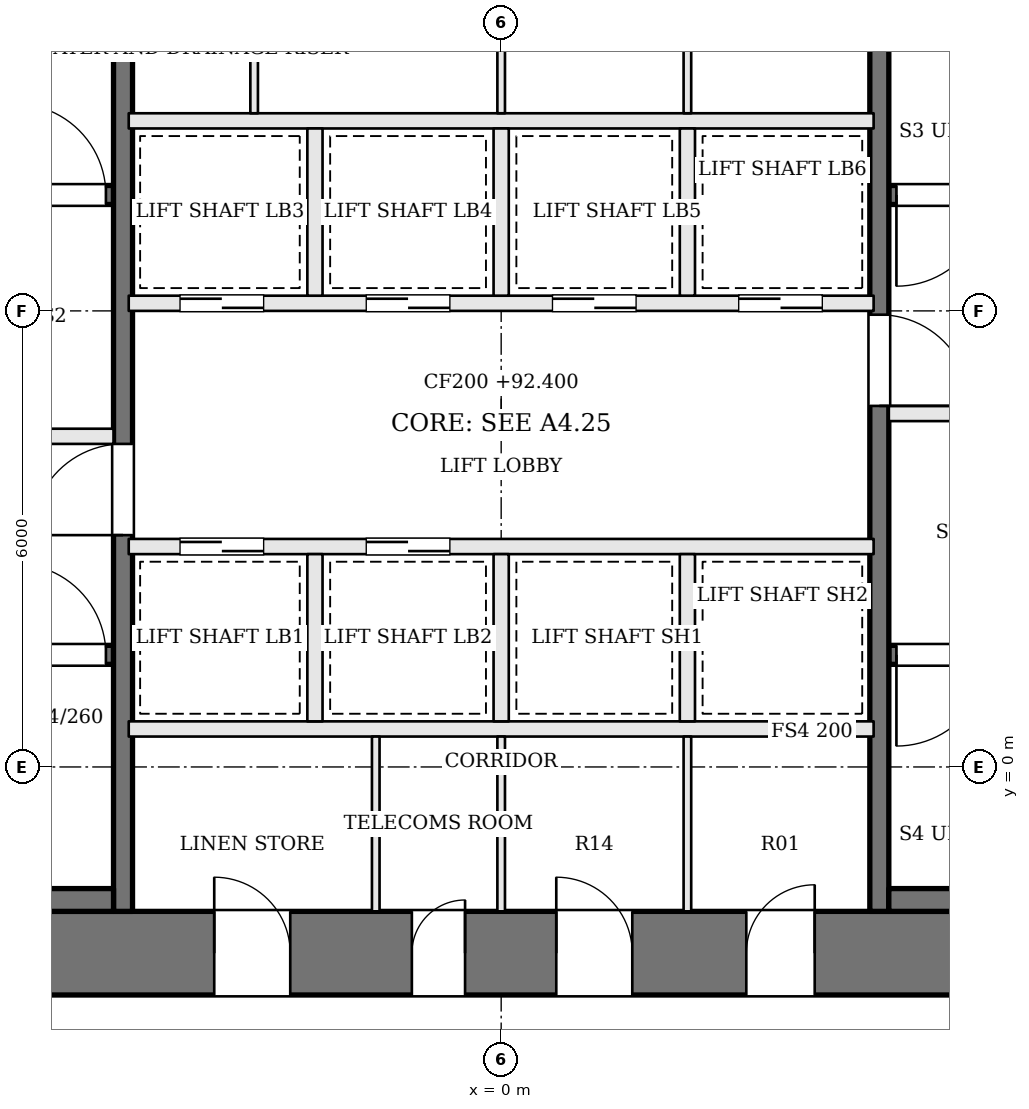
"""IFC4 building model, lengths in metres.
Left out: names, types, materials, properties, quantities, classifications, styles, units other than length and angle.
Written with IfcOpenShell. Run it as: python <this file> out.ifc"""

import sys

from ifc_helpers import new_model, si_unit, direction, frame, frame_2d, origin, place, context, subcontext, project, spatial, rectangle, extrude, element, fill, save


model = new_model("IFC4")
c1 = context("Model", 3, precision=1e-05, world=origin(), true_north=direction((0.0, 1.0)))
c2 = subcontext(c1, "Body", "Model", "MODEL_VIEW")
j1 = project(units=[si_unit("LENGTHUNIT", "METRE"), si_unit("PLANEANGLEUNIT", "RADIAN")], contexts=[c1])
p1 = place(None, origin())
s1 = spatial("IfcSite", under=j1, at=p1, CompositionType="ELEMENT")
p2 = place(p1, origin())
s2 = spatial("IfcBuilding", under=s1, at=p2, CompositionType="ELEMENT")
p3 = place(p2, frame((0.0, 0.0, 92.4)))
s3 = spatial("IfcBuildingStorey", under=s2, at=p3, CompositionType="ELEMENT", Elevation=92.4)
p4 = place(p3, frame((-13.0, -2.45, 0.0), z_axis=(0.0, 0.0, 1.0), x_axis=(1.0, 0.0, 0.0)))
e1 = element("IfcWall", 1, at=p4, inside=s3, PredefinedType="SHEAR", context=c2, shape_type="SweptSolid", body=[
    extrude(rectangle(XDim=26.0, YDim=1.1, at=frame_2d((13.0, 0.0))), origin(), (0.0, 0.0, 1.0), 3.6),
])
p5 = place(p4, frame((9.225, 0.0, 0.0)))
e2 = element("IfcOpeningElement", 2, at=p5, cuts=e1, PredefinedType="OPENING", context=c2, shape_type="SweptSolid", body=[
    extrude(rectangle(XDim=1.0, YDim=2.1, at=frame_2d((0.5, 1.05))), frame((0.0, 0.56, 0.0), z_axis=(0.0, -1.0, 0.0), x_axis=(1.0, 0.0, 0.0)), (0.0, 0.0, 1.0), 1.12),
])
p6 = place(p4, frame((11.825, 0.0, 0.0)))
e3 = element("IfcOpeningElement", 3, at=p6, cuts=e1, PredefinedType="OPENING", context=c2, shape_type="SweptSolid", body=[
    extrude(rectangle(XDim=0.7, YDim=2.1, at=frame_2d((0.35, 1.05))), frame((0.0, 0.56, 0.0), z_axis=(0.0, -1.0, 0.0), x_axis=(1.0, 0.0, 0.0)), (0.0, 0.0, 1.0), 1.12),
])
p7 = place(p4, frame((13.725, 0.0, 0.0)))
e4 = element("IfcOpeningElement", 4, at=p7, cuts=e1, PredefinedType="OPENING", context=c2, shape_type="SweptSolid", body=[
    extrude(rectangle(XDim=1.0, YDim=2.1, at=frame_2d((0.5, 1.05))), frame((0.0, 0.56, 0.0), z_axis=(0.0, -1.0, 0.0), x_axis=(1.0, 0.0, 0.0)), (0.0, 0.0, 1.0), 1.12),
])
p8 = place(p4, frame((16.225, 0.0, 0.0)))
e5 = element("IfcOpeningElement", 5, at=p8, cuts=e1, PredefinedType="OPENING", context=c2, shape_type="SweptSolid", body=[
    extrude(rectangle(XDim=0.9, YDim=2.1, at=frame_2d((0.45, 1.05))), frame((0.0, 0.56, 0.0), z_axis=(0.0, -1.0, 0.0), x_axis=(1.0, 0.0, 0.0)), (0.0, 0.0, 1.0), 1.12),
])
p9 = place(p3, frame((-11.9, 1.475, 0.0), z_axis=(0.0, 0.0, 1.0), x_axis=(1.0, 0.0, 0.0)))
e6 = element("IfcWall", 6, at=p9, inside=s3, PredefinedType="SOLIDWALL", context=c2, shape_type="SweptSolid", body=[
    extrude(rectangle(XDim=6.8, YDim=0.25, at=frame_2d((3.4, 0.0))), origin(), (0.0, 0.0, 1.0), 3.4),
])
p10 = place(p9, frame((5.5, 0.0, 0.0)))
e7 = element("IfcOpeningElement", 7, at=p10, cuts=e6, PredefinedType="OPENING", context=c2, shape_type="SweptSolid", body=[
    extrude(rectangle(XDim=1.2, YDim=2.1, at=frame_2d((0.6, 1.05))), frame((0.0, 0.135, 0.0), z_axis=(0.0, -1.0, 0.0), x_axis=(1.0, 0.0, 0.0)), (0.0, 0.0, 1.0), 0.27),
])
p11 = place(p3, frame((11.9, 7.525, 0.0), z_axis=(0.0, 0.0, 1.0), x_axis=(-1.0, 0.0, 0.0)))
e8 = element("IfcWall", 8, at=p11, inside=s3, PredefinedType="SOLIDWALL", context=c2, shape_type="SweptSolid", body=[
    extrude(rectangle(XDim=6.8, YDim=0.25, at=frame_2d((3.4, 0.0))), origin(), (0.0, 0.0, 1.0), 3.4),
])
p12 = place(p11, frame((5.5, 0.0, 0.0)))
e9 = element("IfcOpeningElement", 9, at=p12, cuts=e8, PredefinedType="OPENING", context=c2, shape_type="SweptSolid", body=[
    extrude(rectangle(XDim=1.2, YDim=2.1, at=frame_2d((0.6, 1.05))), frame((0.0, 0.135, 0.0), z_axis=(0.0, -1.0, 0.0), x_axis=(1.0, 0.0, 0.0)), (0.0, 0.0, 1.0), 0.27),
])
p13 = place(p3, frame((-11.9, 4.35, 0.0), z_axis=(0.0, 0.0, 1.0), x_axis=(1.0, 0.0, 0.0)))
e10 = element("IfcWall", 10, at=p13, inside=s3, PredefinedType="SOLIDWALL", context=c2, shape_type="SweptSolid", body=[
    extrude(rectangle(XDim=6.8, YDim=0.2, at=frame_2d((3.4, 0.0))), origin(), (0.0, 0.0, 1.0), 3.4),
])
p14 = place(p13, frame((4.1, 0.0, 0.0)))
e11 = element("IfcOpeningElement", 11, at=p14, cuts=e10, PredefinedType="OPENING", context=c2, shape_type="SweptSolid", body=[
    extrude(rectangle(XDim=1.2, YDim=2.1, at=frame_2d((0.6, 1.05))), frame((0.0, 0.11, 0.0), z_axis=(0.0, -1.0, 0.0), x_axis=(1.0, 0.0, 0.0)), (0.0, 0.0, 1.0), 0.22),
])
p15 = place(p13, frame((0.8, 0.0, 0.0)))
e12 = element("IfcOpeningElement", 12, at=p15, cuts=e10, PredefinedType="OPENING", context=c2, shape_type="SweptSolid", body=[
    extrude(rectangle(XDim=1.2, YDim=2.1, at=frame_2d((0.6, 1.05))), frame((0.0, 0.11, 0.0), z_axis=(0.0, -1.0, 0.0), x_axis=(1.0, 0.0, 0.0)), (0.0, 0.0, 1.0), 0.22),
])
p16 = place(p3, frame((11.9, 4.65, 0.0), z_axis=(0.0, 0.0, 1.0), x_axis=(-1.0, 0.0, 0.0)))
e13 = element("IfcWall", 13, at=p16, inside=s3, PredefinedType="SOLIDWALL", context=c2, shape_type="SweptSolid", body=[
    extrude(rectangle(XDim=6.8, YDim=0.2, at=frame_2d((3.4, 0.0))), origin(), (0.0, 0.0, 1.0), 3.4),
])
p17 = place(p16, frame((4.1, 0.0, 0.0)))
e14 = element("IfcOpeningElement", 14, at=p17, cuts=e13, PredefinedType="OPENING", context=c2, shape_type="SweptSolid", body=[
    extrude(rectangle(XDim=1.2, YDim=2.1, at=frame_2d((0.6, 1.05))), frame((0.0, 0.11, 0.0), z_axis=(0.0, -1.0, 0.0), x_axis=(1.0, 0.0, 0.0)), (0.0, 0.0, 1.0), 0.22),
])
p18 = place(p16, frame((0.8, 0.0, 0.0)))
e15 = element("IfcOpeningElement", 15, at=p18, cuts=e13, PredefinedType="OPENING", context=c2, shape_type="SweptSolid", body=[
    extrude(rectangle(XDim=1.2, YDim=2.1, at=frame_2d((0.6, 1.05))), frame((0.0, 0.11, 0.0), z_axis=(0.0, -1.0, 0.0), x_axis=(1.0, 0.0, 0.0)), (0.0, 0.0, 1.0), 0.22),
])
p19 = place(p3, frame((-11.9, 7.525, 0.0), z_axis=(0.0, 0.0, 1.0), x_axis=(1.0, 0.0, 0.0)))
e16 = element("IfcWall", 16, at=p19, inside=s3, PredefinedType="SOLIDWALL", context=c2, shape_type="SweptSolid", body=[
    extrude(rectangle(XDim=6.8, YDim=0.25, at=frame_2d((3.4, 0.0))), origin(), (0.0, 0.0, 1.0), 3.4),
])
p20 = place(p19, frame((5.5, 0.0, 0.0)))
e17 = element("IfcOpeningElement", 17, at=p20, cuts=e16, PredefinedType="OPENING", context=c2, shape_type="SweptSolid", body=[
    extrude(rectangle(XDim=1.2, YDim=2.1, at=frame_2d((0.6, 1.05))), frame((0.0, 0.135, 0.0), z_axis=(0.0, -1.0, 0.0), x_axis=(1.0, 0.0, 0.0)), (0.0, 0.0, 1.0), 0.27),
])
p21 = place(p3, frame((11.9, 1.475, 0.0), z_axis=(0.0, 0.0, 1.0), x_axis=(-1.0, 0.0, 0.0)))
e18 = element("IfcWall", 18, at=p21, inside=s3, PredefinedType="SOLIDWALL", context=c2, shape_type="SweptSolid", body=[
    extrude(rectangle(XDim=6.8, YDim=0.25, at=frame_2d((3.4, 0.0))), origin(), (0.0, 0.0, 1.0), 3.4),
])
p22 = place(p21, frame((5.5, 0.0, 0.0)))
e19 = element("IfcOpeningElement", 19, at=p22, cuts=e18, PredefinedType="OPENING", context=c2, shape_type="SweptSolid", body=[
    extrude(rectangle(XDim=1.2, YDim=2.1, at=frame_2d((0.6, 1.05))), frame((0.0, 0.135, 0.0), z_axis=(0.0, -1.0, 0.0), x_axis=(1.0, 0.0, 0.0)), (0.0, 0.0, 1.0), 0.27),
])
p23 = place(p3, frame((-4.975, -1.9, 0.0), z_axis=(0.0, 0.0, 1.0), x_axis=(0.0, 1.0, 0.0)))
e20 = element("IfcWall", 20, at=p23, inside=s3, PredefinedType="SOLIDWALL", context=c2, shape_type="SweptSolid", body=[
    extrude(rectangle(XDim=12.8, YDim=0.25, at=frame_2d((6.4, 0.0))), origin(), (0.0, 0.0, 1.0), 3.4),
])
p24 = place(p23, frame((4.95, 0.0, 0.0)))
e21 = element("IfcOpeningElement", 21, at=p24, cuts=e20, PredefinedType="OPENING", context=c2, shape_type="SweptSolid", body=[
    extrude(rectangle(XDim=1.2, YDim=2.1, at=frame_2d((0.6, 1.05))), frame((0.0, 0.135, 0.0), z_axis=(0.0, -1.0, 0.0), x_axis=(1.0, 0.0, 0.0)), (0.0, 0.0, 1.0), 0.27),
])
p25 = place(p3, frame((4.975, 10.9, 0.0), z_axis=(0.0, 0.0, 1.0), x_axis=(0.0, -1.0, 0.0)))
e22 = element("IfcWall", 22, at=p25, inside=s3, PredefinedType="SOLIDWALL", context=c2, shape_type="SweptSolid", body=[
    extrude(rectangle(XDim=12.8, YDim=0.25, at=frame_2d((6.4, 0.0))), origin(), (0.0, 0.0, 1.0), 3.4),
])
p26 = place(p25, frame((4.95, 0.0, 0.0)))
e23 = element("IfcOpeningElement", 23, at=p26, cuts=e22, PredefinedType="OPENING", context=c2, shape_type="SweptSolid", body=[
    extrude(rectangle(XDim=1.2, YDim=2.1, at=frame_2d((0.6, 1.05))), frame((0.0, 0.135, 0.0), z_axis=(0.0, -1.0, 0.0), x_axis=(1.0, 0.0, 0.0)), (0.0, 0.0, 1.0), 0.27),
])
for number, where, z_axis, x_axis in (
    (24, (-11.9, -1.75, 0.0), (0.0, 0.0, 1.0), (1.0, 0.0, 0.0)),
    (25, (11.9, -1.75, 0.0), (0.0, 0.0, 1.0), (-1.0, 0.0, 0.0)),
):
    element("IfcWall", number, at=place(p3, frame(where, z_axis=z_axis, x_axis=x_axis)), inside=s3, PredefinedType="SOLIDWALL", context=c2, shape_type="SweptSolid", body=[
        extrude(rectangle(XDim=6.8, YDim=0.3, at=frame_2d((3.4, 0.0))), origin(), (0.0, 0.0, 1.0), 3.4),
    ])
p27 = place(p3, frame((-4.9, 0.5, 0.0), z_axis=(0.0, 0.0, 1.0), x_axis=(1.0, 0.0, 0.0)))
e26 = element("IfcWall", 26, at=p27, inside=s3, PredefinedType="SOLIDWALL", context=c2, shape_type="SweptSolid", body=[
    extrude(rectangle(XDim=9.8, YDim=0.2, at=frame_2d((4.9, 0.0))), origin(), (0.0, 0.0, 1.0), 3.4),
])
p28 = place(p3, frame((-4.9, 2.9, 0.0), z_axis=(0.0, 0.0, 1.0), x_axis=(1.0, 0.0, 0.0)))
e27 = element("IfcWall", 27, at=p28, inside=s3, PredefinedType="SOLIDWALL", context=c2, shape_type="SweptSolid", body=[
    extrude(rectangle(XDim=9.8, YDim=0.2, at=frame_2d((4.9, 0.0))), origin(), (0.0, 0.0, 1.0), 3.4),
])
p29 = place(p28, frame((0.675, 0.0, 0.0)))
e28 = element("IfcOpeningElement", 28, at=p29, cuts=e27, PredefinedType="OPENING", context=c2, shape_type="SweptSolid", body=[
    extrude(rectangle(XDim=1.1, YDim=2.1, at=frame_2d((0.55, 1.05))), frame((0.0, 0.11, 0.0), z_axis=(0.0, -1.0, 0.0), x_axis=(1.0, 0.0, 0.0)), (0.0, 0.0, 1.0), 0.22),
])
p30 = place(p28, frame((3.125, 0.0, 0.0)))
e29 = element("IfcOpeningElement", 29, at=p30, cuts=e27, PredefinedType="OPENING", context=c2, shape_type="SweptSolid", body=[
    extrude(rectangle(XDim=1.1, YDim=2.1, at=frame_2d((0.55, 1.05))), frame((0.0, 0.11, 0.0), z_axis=(0.0, -1.0, 0.0), x_axis=(1.0, 0.0, 0.0)), (0.0, 0.0, 1.0), 0.22),
])
p31 = place(p3, frame((-4.9, 6.1, 0.0), z_axis=(0.0, 0.0, 1.0), x_axis=(1.0, 0.0, 0.0)))
e30 = element("IfcWall", 30, at=p31, inside=s3, PredefinedType="SOLIDWALL", context=c2, shape_type="SweptSolid", body=[
    extrude(rectangle(XDim=9.8, YDim=0.2, at=frame_2d((4.9, 0.0))), origin(), (0.0, 0.0, 1.0), 3.4),
])
p32 = place(p31, frame((0.675, 0.0, 0.0)))
e31 = element("IfcOpeningElement", 31, at=p32, cuts=e30, PredefinedType="OPENING", context=c2, shape_type="SweptSolid", body=[
    extrude(rectangle(XDim=1.1, YDim=2.1, at=frame_2d((0.55, 1.05))), frame((0.0, 0.11, 0.0), z_axis=(0.0, -1.0, 0.0), x_axis=(1.0, 0.0, 0.0)), (0.0, 0.0, 1.0), 0.22),
])
p33 = place(p31, frame((3.125, 0.0, 0.0)))
e32 = element("IfcOpeningElement", 32, at=p33, cuts=e30, PredefinedType="OPENING", context=c2, shape_type="SweptSolid", body=[
    extrude(rectangle(XDim=1.1, YDim=2.1, at=frame_2d((0.55, 1.05))), frame((0.0, 0.11, 0.0), z_axis=(0.0, -1.0, 0.0), x_axis=(1.0, 0.0, 0.0)), (0.0, 0.0, 1.0), 0.22),
])
p34 = place(p31, frame((5.575, 0.0, 0.0)))
e33 = element("IfcOpeningElement", 33, at=p34, cuts=e30, PredefinedType="OPENING", context=c2, shape_type="SweptSolid", body=[
    extrude(rectangle(XDim=1.1, YDim=2.1, at=frame_2d((0.55, 1.05))), frame((0.0, 0.11, 0.0), z_axis=(0.0, -1.0, 0.0), x_axis=(1.0, 0.0, 0.0)), (0.0, 0.0, 1.0), 0.22),
])
p35 = place(p31, frame((8.025, 0.0, 0.0)))
e34 = element("IfcOpeningElement", 34, at=p35, cuts=e30, PredefinedType="OPENING", context=c2, shape_type="SweptSolid", body=[
    extrude(rectangle(XDim=1.1, YDim=2.1, at=frame_2d((0.55, 1.05))), frame((0.0, 0.11, 0.0), z_axis=(0.0, -1.0, 0.0), x_axis=(1.0, 0.0, 0.0)), (0.0, 0.0, 1.0), 0.22),
])
p36 = place(p3, frame((-4.9, 8.5, 0.0), z_axis=(0.0, 0.0, 1.0), x_axis=(1.0, 0.0, 0.0)))
e35 = element("IfcWall", 35, at=p36, inside=s3, PredefinedType="SOLIDWALL", context=c2, shape_type="SweptSolid", body=[
    extrude(rectangle(XDim=9.8, YDim=0.2, at=frame_2d((4.9, 0.0))), origin(), (0.0, 0.0, 1.0), 3.4),
])
for number, where, z_axis, x_axis in (
    (36, (-2.45, 0.6, 0.0), (0.0, 0.0, 1.0), (0.0, 1.0, 0.0)),
    (37, (0.0, 0.6, 0.0), (0.0, 0.0, 1.0), (0.0, 1.0, 0.0)),
    (38, (2.45, 0.6, 0.0), (0.0, 0.0, 1.0), (0.0, 1.0, 0.0)),
    (39, (-2.45, 6.2, 0.0), (0.0, 0.0, 1.0), (0.0, 1.0, 0.0)),
    (40, (0.0, 6.2, 0.0), (0.0, 0.0, 1.0), (0.0, 1.0, 0.0)),
    (41, (2.45, 6.2, 0.0), (0.0, 0.0, 1.0), (0.0, 1.0, 0.0)),
):
    element("IfcWall", number, at=place(p3, frame(where, z_axis=z_axis, x_axis=x_axis)), inside=s3, PredefinedType="SOLIDWALL", context=c2, shape_type="SweptSolid", body=[
        extrude(rectangle(XDim=2.2, YDim=0.2, at=frame_2d((1.1, 0.0))), origin(), (0.0, 0.0, 1.0), 3.4),
    ])
for number, where, z_axis, x_axis in (
    (42, (-1.65, -1.9, 0.0), (0.0, 0.0, 1.0), (0.0, 1.0, 0.0)),
    (43, (0.0, -1.9, 0.0), (0.0, 0.0, 1.0), (0.0, 1.0, 0.0)),
    (44, (2.45, -1.9, 0.0), (0.0, 0.0, 1.0), (0.0, 1.0, 0.0)),
    (45, (-3.25, 8.6, 0.0), (0.0, 0.0, 1.0), (0.0, 1.0, 0.0)),
    (46, (0.0, 8.6, 0.0), (0.0, 0.0, 1.0), (0.0, 1.0, 0.0)),
    (47, (2.45, 8.6, 0.0), (0.0, 0.0, 1.0), (0.0, 1.0, 0.0)),
):
    element("IfcWall", number, at=place(p3, frame(where, z_axis=z_axis, x_axis=x_axis)), inside=s3, PredefinedType="PARTITIONING", context=c2, shape_type="SweptSolid", body=[
        extrude(rectangle(XDim=2.3, YDim=0.1, at=frame_2d((1.15, 0.0))), origin(), (0.0, 0.0, 1.0), 3.4),
    ])
p37 = place(p24, origin())
e48 = element("IfcDoor", 48, at=p37, inside=s3, OperationType="SINGLE_SWING_LEFT", PredefinedType="DOOR", context=c2, shape_type="SweptSolid", body=[
    extrude(rectangle(XDim=1.2, YDim=2.1, at=frame_2d((0.6, 1.05))), frame((0.0, 0.025, 0.0), z_axis=(0.0, -1.0, 0.0), x_axis=(1.0, 0.0, 0.0)), (0.0, 0.0, 1.0), 0.05),
])
fill(e21, e48)
p38 = place(p26, origin())
e49 = element("IfcDoor", 49, at=p38, inside=s3, OperationType="SINGLE_SWING_RIGHT", PredefinedType="DOOR", context=c2, shape_type="SweptSolid", body=[
    extrude(rectangle(XDim=1.2, YDim=2.1, at=frame_2d((0.6, 1.05))), frame((0.0, 0.025, 0.0), z_axis=(0.0, -1.0, 0.0), x_axis=(1.0, 0.0, 0.0)), (0.0, 0.0, 1.0), 0.05),
])
fill(e23, e49)
p39 = place(p10, origin())
e50 = element("IfcDoor", 50, at=p39, inside=s3, OperationType="SINGLE_SWING_LEFT", PredefinedType="DOOR", context=c2, shape_type="SweptSolid", body=[
    extrude(rectangle(XDim=1.2, YDim=2.1, at=frame_2d((0.6, 1.05))), frame((0.0, 0.025, 0.0), z_axis=(0.0, -1.0, 0.0), x_axis=(1.0, 0.0, 0.0)), (0.0, 0.0, 1.0), 0.05),
])
fill(e7, e50)
p40 = place(p12, origin())
e51 = element("IfcDoor", 51, at=p40, inside=s3, OperationType="SINGLE_SWING_RIGHT", PredefinedType="DOOR", context=c2, shape_type="SweptSolid", body=[
    extrude(rectangle(XDim=1.2, YDim=2.1, at=frame_2d((0.6, 1.05))), frame((0.0, 0.025, 0.0), z_axis=(0.0, -1.0, 0.0), x_axis=(1.0, 0.0, 0.0)), (0.0, 0.0, 1.0), 0.05),
])
fill(e9, e51)
p41 = place(p20, origin())
e52 = element("IfcDoor", 52, at=p41, inside=s3, OperationType="SINGLE_SWING_LEFT", PredefinedType="DOOR", context=c2, shape_type="SweptSolid", body=[
    extrude(rectangle(XDim=1.2, YDim=2.1, at=frame_2d((0.6, 1.05))), frame((0.0, 0.025, 0.0), z_axis=(0.0, -1.0, 0.0), x_axis=(1.0, 0.0, 0.0)), (0.0, 0.0, 1.0), 0.05),
])
fill(e17, e52)
p42 = place(p22, origin())
e53 = element("IfcDoor", 53, at=p42, inside=s3, OperationType="SINGLE_SWING_RIGHT", PredefinedType="DOOR", context=c2, shape_type="SweptSolid", body=[
    extrude(rectangle(XDim=1.2, YDim=2.1, at=frame_2d((0.6, 1.05))), frame((0.0, 0.025, 0.0), z_axis=(0.0, -1.0, 0.0), x_axis=(1.0, 0.0, 0.0)), (0.0, 0.0, 1.0), 0.05),
])
fill(e19, e53)
p43 = place(p29, origin())
e54 = element("IfcDoor", 54, at=p43, inside=s3, OperationType="SLIDING_TO_RIGHT", PredefinedType="DOOR", context=c2, shape_type="SweptSolid", body=[
    extrude(rectangle(XDim=1.1, YDim=2.1, at=frame_2d((0.55, 1.05))), frame((0.0, 0.025, 0.0), z_axis=(0.0, -1.0, 0.0), x_axis=(1.0, 0.0, 0.0)), (0.0, 0.0, 1.0), 0.05),
])
fill(e28, e54)
p44 = place(p30, origin())
e55 = element("IfcDoor", 55, at=p44, inside=s3, OperationType="SLIDING_TO_LEFT", PredefinedType="DOOR", context=c2, shape_type="SweptSolid", body=[
    extrude(rectangle(XDim=1.1, YDim=2.1, at=frame_2d((0.55, 1.05))), frame((0.0, 0.025, 0.0), z_axis=(0.0, -1.0, 0.0), x_axis=(1.0, 0.0, 0.0)), (0.0, 0.0, 1.0), 0.05),
])
fill(e29, e55)
p45 = place(p32, origin())
e56 = element("IfcDoor", 56, at=p45, inside=s3, OperationType="SLIDING_TO_RIGHT", PredefinedType="DOOR", context=c2, shape_type="SweptSolid", body=[
    extrude(rectangle(XDim=1.1, YDim=2.1, at=frame_2d((0.55, 1.05))), frame((0.0, 0.025, 0.0), z_axis=(0.0, -1.0, 0.0), x_axis=(1.0, 0.0, 0.0)), (0.0, 0.0, 1.0), 0.05),
])
fill(e31, e56)
p46 = place(p33, origin())
e57 = element("IfcDoor", 57, at=p46, inside=s3, OperationType="SLIDING_TO_LEFT", PredefinedType="DOOR", context=c2, shape_type="SweptSolid", body=[
    extrude(rectangle(XDim=1.1, YDim=2.1, at=frame_2d((0.55, 1.05))), frame((0.0, 0.025, 0.0), z_axis=(0.0, -1.0, 0.0), x_axis=(1.0, 0.0, 0.0)), (0.0, 0.0, 1.0), 0.05),
])
fill(e32, e57)
p47 = place(p34, origin())
e58 = element("IfcDoor", 58, at=p47, inside=s3, OperationType="SLIDING_TO_RIGHT", PredefinedType="DOOR", context=c2, shape_type="SweptSolid", body=[
    extrude(rectangle(XDim=1.1, YDim=2.1, at=frame_2d((0.55, 1.05))), frame((0.0, 0.025, 0.0), z_axis=(0.0, -1.0, 0.0), x_axis=(1.0, 0.0, 0.0)), (0.0, 0.0, 1.0), 0.05),
])
fill(e33, e58)
p48 = place(p35, origin())
e59 = element("IfcDoor", 59, at=p48, inside=s3, OperationType="SLIDING_TO_LEFT", PredefinedType="DOOR", context=c2, shape_type="SweptSolid", body=[
    extrude(rectangle(XDim=1.1, YDim=2.1, at=frame_2d((0.55, 1.05))), frame((0.0, 0.025, 0.0), z_axis=(0.0, -1.0, 0.0), x_axis=(1.0, 0.0, 0.0)), (0.0, 0.0, 1.0), 0.05),
])
fill(e34, e59)
p49 = place(p5, origin())
e60 = element("IfcDoor", 60, at=p49, inside=s3, OperationType="SINGLE_SWING_LEFT", PredefinedType="DOOR", context=c2, shape_type="SweptSolid", body=[
    extrude(rectangle(XDim=1.0, YDim=2.1, at=frame_2d((0.5, 1.05))), frame((0.0, 0.025, 0.0), z_axis=(0.0, -1.0, 0.0), x_axis=(1.0, 0.0, 0.0)), (0.0, 0.0, 1.0), 0.05),
])
fill(e2, e60)
p50 = place(p6, origin())
e61 = element("IfcDoor", 61, at=p50, inside=s3, OperationType="SINGLE_SWING_RIGHT", PredefinedType="DOOR", context=c2, shape_type="SweptSolid", body=[
    extrude(rectangle(XDim=0.7, YDim=2.1, at=frame_2d((0.35, 1.05))), frame((0.0, 0.025, 0.0), z_axis=(0.0, -1.0, 0.0), x_axis=(1.0, 0.0, 0.0)), (0.0, 0.0, 1.0), 0.05),
])
fill(e3, e61)
p51 = place(p7, origin())
e62 = element("IfcDoor", 62, at=p51, inside=s3, OperationType="SINGLE_SWING_LEFT", PredefinedType="DOOR", context=c2, shape_type="SweptSolid", body=[
    extrude(rectangle(XDim=1.0, YDim=2.1, at=frame_2d((0.5, 1.05))), frame((0.0, 0.025, 0.0), z_axis=(0.0, -1.0, 0.0), x_axis=(1.0, 0.0, 0.0)), (0.0, 0.0, 1.0), 0.05),
])
fill(e4, e62)
p52 = place(p8, origin())
e63 = element("IfcDoor", 63, at=p52, inside=s3, OperationType="SINGLE_SWING_RIGHT", PredefinedType="DOOR", context=c2, shape_type="SweptSolid", body=[
    extrude(rectangle(XDim=0.9, YDim=2.1, at=frame_2d((0.45, 1.05))), frame((0.0, 0.025, 0.0), z_axis=(0.0, -1.0, 0.0), x_axis=(1.0, 0.0, 0.0)), (0.0, 0.0, 1.0), 0.05),
])
fill(e5, e63)
save(model, sys.argv[1])
